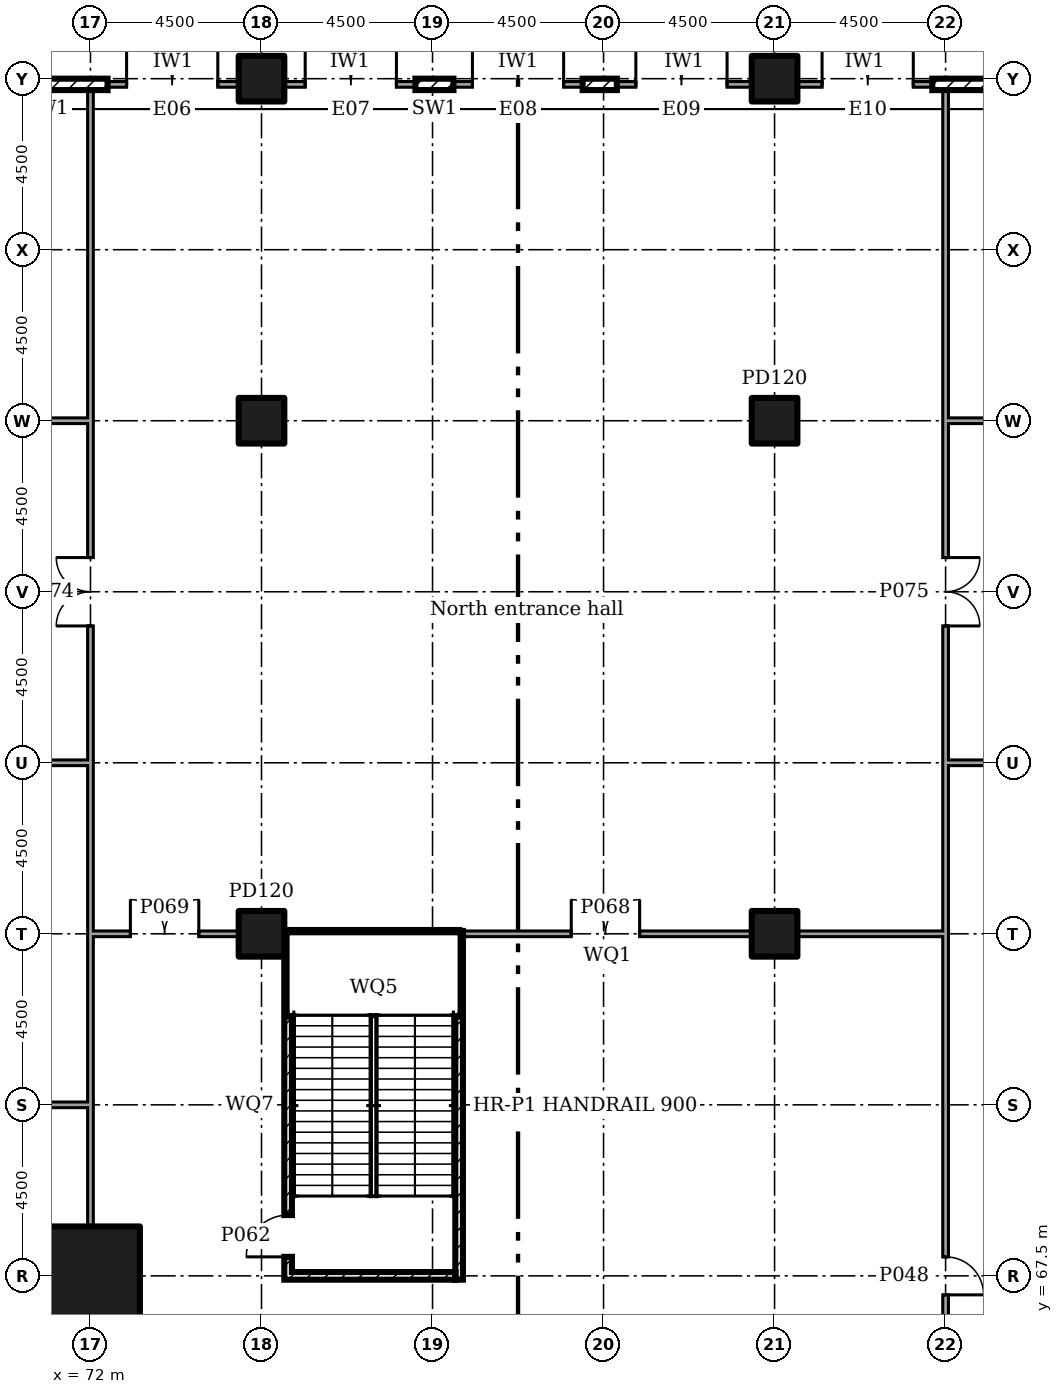
"""IFC4 building model, lengths in metres.
Left out: names, types, materials, properties, quantities, classifications, styles, units other than length and angle.
Written with IfcOpenShell. Run it as: python <this file> out.ifc"""

import sys

from ifc_helpers import new_model, si_unit, direction, frame, frame_2d, origin, origin_2d, place, context, subcontext, project, spatial, rectangle, extrude, element, fill, save


model = new_model("IFC4")
c1 = context("Model", 3, precision=1e-05, world=origin(), true_north=direction((0.0, 1.0)))
c2 = subcontext(c1, "Body", "Model", "MODEL_VIEW")
j1 = project(units=[si_unit("LENGTHUNIT", "METRE"), si_unit("PLANEANGLEUNIT", "RADIAN")], contexts=[c1])
p1 = place(None, origin())
s1 = spatial("IfcSite", under=j1, at=p1, CompositionType="ELEMENT")
p2 = place(p1, origin())
s2 = spatial("IfcBuilding", under=s1, at=p2, CompositionType="ELEMENT")
p3 = place(p2, origin())
s3 = spatial("IfcBuildingStorey", under=s2, at=p3, CompositionType="ELEMENT", Elevation=0.0)
p4 = place(p3, frame((72.0, 67.5, 0.0)))
e1 = element("IfcColumn", 1, at=p4, inside=s3, PredefinedType="COLUMN", context=c2, shape_type="SweptSolid", body=[
    extrude(rectangle(XDim=2.6, YDim=2.6, at=origin_2d()), origin(), (0.0, 0.0, 1.0), 6.0),
])
for number, where in (
    (2, (76.5, 76.5, 0.0)),
    (3, (76.5, 90.0, 0.0)),
    (4, (76.5, 99.0, 0.0)),
    (5, (90.0, 76.5, 0.0)),
    (6, (90.0, 90.0, 0.0)),
    (7, (90.0, 99.0, 0.0)),
):
    element("IfcColumn", number, at=place(p3, frame(where)), inside=s3, PredefinedType="COLUMN", context=c2, shape_type="SweptSolid", body=[
        extrude(rectangle(XDim=1.2, YDim=1.2, at=origin_2d()), origin(), (0.0, 0.0, 1.0), 6.0),
    ])
p5 = place(p3, frame((97.2, 98.85, 0.0), z_axis=(0.0, 0.0, 1.0), x_axis=(-1.0, 0.0, 0.0)))
e8 = element("IfcWall", 8, at=p5, inside=s3, PredefinedType="ELEMENTEDWALL", context=c2, shape_type="SweptSolid", body=[
    extrude(rectangle(XDim=3.05, YDim=0.3, at=frame_2d((1.525, 0.0))), origin(), (0.0, 0.0, 1.0), 5.55),
])
p6 = place(p3, frame((94.15, 98.85, 0.0), z_axis=(0.0, 0.0, 1.0), x_axis=(-1.0, 0.0, 0.0)))
e9 = element("IfcWall", 9, at=p6, inside=s3, PredefinedType="SOLIDWALL", context=c2, shape_type="SweptSolid", body=[
    extrude(rectangle(XDim=3.55, YDim=0.15, at=frame_2d((1.775, 0.0))), origin(), (0.0, 0.0, 1.0), 5.55),
])
p7 = place(p6, frame((0.5, 0.0, 0.0)))
e10 = element("IfcOpeningElement", 10, at=p7, cuts=e9, PredefinedType="OPENING", context=c2, shape_type="SweptSolid", body=[
    extrude(rectangle(XDim=2.4, YDim=2.7, at=frame_2d((1.2, 1.35))), frame((0.0, 0.085, 0.0), z_axis=(0.0, -1.0, 0.0), x_axis=(1.0, 0.0, 0.0)), (0.0, 0.0, 1.0), 0.17),
])
p8 = place(p3, frame((89.4, 98.85, 0.0), z_axis=(0.0, 0.0, 1.0), x_axis=(-1.0, 0.0, 0.0)))
e11 = element("IfcWall", 11, at=p8, inside=s3, PredefinedType="SOLIDWALL", context=c2, shape_type="SweptSolid", body=[
    extrude(rectangle(XDim=3.55, YDim=0.15, at=frame_2d((1.775, 0.0))), origin(), (0.0, 0.0, 1.0), 5.55),
])
p9 = place(p8, frame((0.65, 0.0, 0.0)))
e12 = element("IfcOpeningElement", 12, at=p9, cuts=e11, PredefinedType="OPENING", context=c2, shape_type="SweptSolid", body=[
    extrude(rectangle(XDim=2.4, YDim=2.7, at=frame_2d((1.2, 1.35))), frame((0.0, 0.085, 0.0), z_axis=(0.0, -1.0, 0.0), x_axis=(1.0, 0.0, 0.0)), (0.0, 0.0, 1.0), 0.17),
])
p10 = place(p3, frame((85.85, 98.85, 0.0), z_axis=(0.0, 0.0, 1.0), x_axis=(-1.0, 0.0, 0.0)))
e13 = element("IfcWall", 13, at=p10, inside=s3, PredefinedType="ELEMENTEDWALL", context=c2, shape_type="SweptSolid", body=[
    extrude(rectangle(XDim=0.9, YDim=0.3, at=frame_2d((0.45, 0.0))), origin(), (0.0, 0.0, 1.0), 5.55),
])
p11 = place(p3, frame((84.95, 98.85, 0.0), z_axis=(0.0, 0.0, 1.0), x_axis=(-1.0, 0.0, 0.0)))
e14 = element("IfcWall", 14, at=p11, inside=s3, PredefinedType="SOLIDWALL", context=c2, shape_type="SweptSolid", body=[
    extrude(rectangle(XDim=3.4, YDim=0.15, at=frame_2d((1.7, 0.0))), origin(), (0.0, 0.0, 1.0), 5.55),
])
p12 = place(p11, frame((0.5, 0.0, 0.0)))
e15 = element("IfcOpeningElement", 15, at=p12, cuts=e14, PredefinedType="OPENING", context=c2, shape_type="SweptSolid", body=[
    extrude(rectangle(XDim=2.4, YDim=2.7, at=frame_2d((1.2, 1.35))), frame((0.0, 0.085, 0.0), z_axis=(0.0, -1.0, 0.0), x_axis=(1.0, 0.0, 0.0)), (0.0, 0.0, 1.0), 0.17),
])
p13 = place(p3, frame((81.55, 98.85, 0.0), z_axis=(0.0, 0.0, 1.0), x_axis=(-1.0, 0.0, 0.0)))
e16 = element("IfcWall", 16, at=p13, inside=s3, PredefinedType="ELEMENTEDWALL", context=c2, shape_type="SweptSolid", body=[
    extrude(rectangle(XDim=1.0, YDim=0.3, at=frame_2d((0.5, 0.0))), origin(), (0.0, 0.0, 1.0), 5.55),
])
p14 = place(p3, frame((80.55, 98.85, 0.0), z_axis=(0.0, 0.0, 1.0), x_axis=(-1.0, 0.0, 0.0)))
e17 = element("IfcWall", 17, at=p14, inside=s3, PredefinedType="SOLIDWALL", context=c2, shape_type="SweptSolid", body=[
    extrude(rectangle(XDim=3.45, YDim=0.15, at=frame_2d((1.725, 0.0))), origin(), (0.0, 0.0, 1.0), 5.55),
])
p15 = place(p14, frame((0.5, 0.0, 0.0)))
e18 = element("IfcOpeningElement", 18, at=p15, cuts=e17, PredefinedType="OPENING", context=c2, shape_type="SweptSolid", body=[
    extrude(rectangle(XDim=2.4, YDim=2.7, at=frame_2d((1.2, 1.35))), frame((0.0, 0.085, 0.0), z_axis=(0.0, -1.0, 0.0), x_axis=(1.0, 0.0, 0.0)), (0.0, 0.0, 1.0), 0.17),
])
p16 = place(p3, frame((75.9, 98.85, 0.0), z_axis=(0.0, 0.0, 1.0), x_axis=(-1.0, 0.0, 0.0)))
e19 = element("IfcWall", 19, at=p16, inside=s3, PredefinedType="SOLIDWALL", context=c2, shape_type="SweptSolid", body=[
    extrude(rectangle(XDim=3.45, YDim=0.15, at=frame_2d((1.725, 0.0))), origin(), (0.0, 0.0, 1.0), 5.55),
])
p17 = place(p16, frame((0.55, 0.0, 0.0)))
e20 = element("IfcOpeningElement", 20, at=p17, cuts=e19, PredefinedType="OPENING", context=c2, shape_type="SweptSolid", body=[
    extrude(rectangle(XDim=2.4, YDim=2.7, at=frame_2d((1.2, 1.35))), frame((0.0, 0.085, 0.0), z_axis=(0.0, -1.0, 0.0), x_axis=(1.0, 0.0, 0.0)), (0.0, 0.0, 1.0), 0.17),
])
p18 = place(p3, frame((72.45, 98.85, 0.0), z_axis=(0.0, 0.0, 1.0), x_axis=(-1.0, 0.0, 0.0)))
e21 = element("IfcWall", 21, at=p18, inside=s3, PredefinedType="ELEMENTEDWALL", context=c2, shape_type="SweptSolid", body=[
    extrude(rectangle(XDim=3.25, YDim=0.3, at=frame_2d((1.625, 0.0))), origin(), (0.0, 0.0, 1.0), 5.55),
])
p19 = place(p3, frame((71.925, 76.5, 0.0)))
e22 = element("IfcWall", 22, at=p19, inside=s3, PredefinedType="PARTITIONING", context=c2, shape_type="SweptSolid", body=[
    extrude(rectangle(XDim=3.98, YDim=0.15, at=frame_2d((1.99, 0.0))), origin(), (0.0, 0.0, 1.0), 5.55),
])
p20 = place(p19, frame((1.125, 0.0, 0.0)))
e23 = element("IfcOpeningElement", 23, at=p20, cuts=e22, PredefinedType="OPENING", context=c2, shape_type="SweptSolid", body=[
    extrude(rectangle(XDim=1.8, YDim=2.1, at=frame_2d((0.9, 1.05))), frame((0.0, 0.085, 0.0), z_axis=(0.0, -1.0, 0.0), x_axis=(1.0, 0.0, 0.0)), (0.0, 0.0, 1.0), 0.17),
])
p21 = place(p3, frame((81.8, 76.5, 0.0)))
e24 = element("IfcWall", 24, at=p21, inside=s3, PredefinedType="PARTITIONING", context=c2, shape_type="SweptSolid", body=[
    extrude(rectangle(XDim=7.605, YDim=0.15, at=frame_2d((3.802, 0.0))), origin(), (0.0, 0.0, 1.0), 5.55),
])
p22 = place(p21, frame((2.85, 0.0, 0.0)))
e25 = element("IfcOpeningElement", 25, at=p22, cuts=e24, PredefinedType="OPENING", context=c2, shape_type="SweptSolid", body=[
    extrude(rectangle(XDim=1.8, YDim=2.1, at=frame_2d((0.9, 1.05))), frame((0.0, 0.085, 0.0), z_axis=(0.0, -1.0, 0.0), x_axis=(1.0, 0.0, 0.0)), (0.0, 0.0, 1.0), 0.17),
])
p23 = place(p3, frame((90.595, 76.5, 0.0)))
e26 = element("IfcWall", 26, at=p23, inside=s3, PredefinedType="PARTITIONING", context=c2, shape_type="SweptSolid", body=[
    extrude(rectangle(XDim=3.98, YDim=0.15, at=frame_2d((1.99, 0.0))), origin(), (0.0, 0.0, 1.0), 5.55),
])
p24 = place(p3, frame((72.0, 71.925, 0.0), z_axis=(0.0, 0.0, 1.0), x_axis=(0.0, 1.0, 0.0)))
e27 = element("IfcWall", 27, at=p24, inside=s3, PredefinedType="PARTITIONING", context=c2, shape_type="SweptSolid", body=[
    extrude(rectangle(XDim=4.5, YDim=0.15, at=frame_2d((2.25, 0.0))), origin(), (0.0, 0.0, 1.0), 5.55),
])
p25 = place(p3, frame((72.0, 68.795, 0.0), z_axis=(0.0, 0.0, 1.0), x_axis=(0.0, 1.0, 0.0)))
e28 = element("IfcWall", 28, at=p25, inside=s3, PredefinedType="PARTITIONING", context=c2, shape_type="SweptSolid", body=[
    extrude(rectangle(XDim=3.205, YDim=0.15, at=frame_2d((1.603, 0.0))), origin(), (0.0, 0.0, 1.0), 5.55),
])
p26 = place(p3, frame((94.5, 58.5, 0.0), z_axis=(0.0, 0.0, 1.0), x_axis=(0.0, 1.0, 0.0)))
e29 = element("IfcWall", 29, at=p26, inside=s3, PredefinedType="PARTITIONING", context=c2, shape_type="SweptSolid", body=[
    extrude(rectangle(XDim=17.925, YDim=0.15, at=frame_2d((8.962, 0.0))), origin(), (0.0, 0.0, 1.0), 5.55),
])
p27 = place(p26, frame((8.5, 0.0, 0.0)))
e30 = element("IfcOpeningElement", 30, at=p27, cuts=e29, PredefinedType="OPENING", context=c2, shape_type="SweptSolid", body=[
    extrude(rectangle(XDim=1.0, YDim=2.1, at=frame_2d((0.5, 1.05))), frame((0.0, 0.085, 0.0), z_axis=(0.0, -1.0, 0.0), x_axis=(1.0, 0.0, 0.0)), (0.0, 0.0, 1.0), 0.17),
])
p28 = place(p3, frame((77.2, 67.4, 0.0), z_axis=(0.0, 0.0, 1.0), x_axis=(0.0, 1.0, 0.0)))
e31 = element("IfcWall", 31, at=p28, inside=s3, PredefinedType="SOLIDWALL", context=c2, shape_type="SweptSolid", body=[
    extrude(rectangle(XDim=9.2, YDim=0.2, at=frame_2d((4.6, 0.0))), origin(), (0.0, 0.0, 1.0), 5.55),
])
p29 = place(p28, frame((0.6, 0.0, 0.0)))
e32 = element("IfcOpeningElement", 32, at=p29, cuts=e31, PredefinedType="OPENING", context=c2, shape_type="SweptSolid", body=[
    extrude(rectangle(XDim=1.1, YDim=2.1, at=frame_2d((0.55, 1.05))), frame((0.0, 0.11, 0.0), z_axis=(0.0, -1.0, 0.0), x_axis=(1.0, 0.0, 0.0)), (0.0, 0.0, 1.0), 0.22),
])
p30 = place(p3, frame((81.7, 67.4, 0.0), z_axis=(0.0, 0.0, 1.0), x_axis=(0.0, 1.0, 0.0)))
e33 = element("IfcWall", 33, at=p30, inside=s3, PredefinedType="SOLIDWALL", context=c2, shape_type="SweptSolid", body=[
    extrude(rectangle(XDim=9.175, YDim=0.2, at=frame_2d((4.587, 0.0))), origin(), (0.0, 0.0, 1.0), 5.55),
])
p31 = place(p3, frame((77.3, 67.5, 0.0)))
e34 = element("IfcWall", 34, at=p31, inside=s3, PredefinedType="SOLIDWALL", context=c2, shape_type="SweptSolid", body=[
    extrude(rectangle(XDim=4.3, YDim=0.2, at=frame_2d((2.15, 0.0))), origin(), (0.0, 0.0, 1.0), 5.55),
])
p32 = place(p3, frame((72.0, 80.925, 0.0), z_axis=(0.0, 0.0, 1.0), x_axis=(0.0, 1.0, 0.0)))
e35 = element("IfcWall", 35, at=p32, inside=s3, PredefinedType="PARTITIONING", context=c2, shape_type="SweptSolid", body=[
    extrude(rectangle(XDim=9.15, YDim=0.15, at=frame_2d((4.575, 0.0))), origin(), (0.0, 0.0, 1.0), 5.55),
])
p33 = place(p32, frame((3.675, 0.0, 0.0)))
e36 = element("IfcOpeningElement", 36, at=p33, cuts=e35, PredefinedType="OPENING", context=c2, shape_type="SweptSolid", body=[
    extrude(rectangle(XDim=1.8, YDim=2.1, at=frame_2d((0.9, 1.05))), frame((0.0, 0.085, 0.0), z_axis=(0.0, -1.0, 0.0), x_axis=(1.0, 0.0, 0.0)), (0.0, 0.0, 1.0), 0.17),
])
p34 = place(p3, frame((72.0, 90.0, 0.0), z_axis=(0.0, 0.0, 1.0), x_axis=(0.0, 1.0, 0.0)))
e37 = element("IfcWall", 37, at=p34, inside=s3, PredefinedType="PARTITIONING", context=c2, shape_type="SweptSolid", body=[
    extrude(rectangle(XDim=8.7, YDim=0.15, at=frame_2d((4.35, 0.0))), origin(), (0.0, 0.0, 1.0), 5.55),
])
p35 = place(p3, frame((72.0, 76.5, 0.0), z_axis=(0.0, 0.0, 1.0), x_axis=(0.0, 1.0, 0.0)))
e38 = element("IfcWall", 38, at=p35, inside=s3, PredefinedType="PARTITIONING", context=c2, shape_type="SweptSolid", body=[
    extrude(rectangle(XDim=4.5, YDim=0.15, at=frame_2d((2.25, 0.0))), origin(), (0.0, 0.0, 1.0), 5.55),
])
p36 = place(p3, frame((94.5, 76.5, 0.0), z_axis=(0.0, 0.0, 1.0), x_axis=(0.0, 1.0, 0.0)))
e39 = element("IfcWall", 39, at=p36, inside=s3, PredefinedType="PARTITIONING", context=c2, shape_type="SweptSolid", body=[
    extrude(rectangle(XDim=4.575, YDim=0.15, at=frame_2d((2.288, 0.0))), origin(), (0.0, 0.0, 1.0), 5.55),
])
p37 = place(p3, frame((94.5, 81.0, 0.0), z_axis=(0.0, 0.0, 1.0), x_axis=(0.0, 1.0, 0.0)))
e40 = element("IfcWall", 40, at=p37, inside=s3, PredefinedType="PARTITIONING", context=c2, shape_type="SweptSolid", body=[
    extrude(rectangle(XDim=9.075, YDim=0.15, at=frame_2d((4.538, 0.0))), origin(), (0.0, 0.0, 1.0), 5.55),
])
p38 = place(p37, frame((3.6, 0.0, 0.0)))
e41 = element("IfcOpeningElement", 41, at=p38, cuts=e40, PredefinedType="OPENING", context=c2, shape_type="SweptSolid", body=[
    extrude(rectangle(XDim=1.8, YDim=2.1, at=frame_2d((0.9, 1.05))), frame((0.0, 0.085, 0.0), z_axis=(0.0, -1.0, 0.0), x_axis=(1.0, 0.0, 0.0)), (0.0, 0.0, 1.0), 0.17),
])
p39 = place(p3, frame((94.5, 90.0, 0.0), z_axis=(0.0, 0.0, 1.0), x_axis=(0.0, 1.0, 0.0)))
e42 = element("IfcWall", 42, at=p39, inside=s3, PredefinedType="PARTITIONING", context=c2, shape_type="SweptSolid", body=[
    extrude(rectangle(XDim=8.7, YDim=0.15, at=frame_2d((4.35, 0.0))), origin(), (0.0, 0.0, 1.0), 5.55),
])
p40 = place(p3, frame((77.3, 76.5, 0.0)))
e43 = element("IfcWall", 43, at=p40, inside=s3, PredefinedType="SOLIDWALL", context=c2, shape_type="SweptSolid", body=[
    extrude(rectangle(XDim=4.4, YDim=0.2, at=frame_2d((2.2, 0.0))), origin(), (0.0, 0.0, 1.0), 5.55),
])
p41 = place(p3, frame((63.595, 90.0, 0.0)))
e44 = element("IfcWall", 44, at=p41, inside=s3, PredefinedType="PARTITIONING", context=c2, shape_type="SweptSolid", body=[
    extrude(rectangle(XDim=8.33, YDim=0.15, at=frame_2d((4.165, 0.0))), origin(), (0.0, 0.0, 1.0), 5.55),
])
p42 = place(p3, frame((58.5, 81.0, 0.0)))
e45 = element("IfcWall", 45, at=p42, inside=s3, PredefinedType="PARTITIONING", context=c2, shape_type="SweptSolid", body=[
    extrude(rectangle(XDim=13.425, YDim=0.15, at=frame_2d((6.712, 0.0))), origin(), (0.0, 0.0, 1.0), 5.55),
])
p43 = place(p42, frame((6.25, 0.0, 0.0)))
e46 = element("IfcOpeningElement", 46, at=p43, cuts=e45, PredefinedType="OPENING", context=c2, shape_type="SweptSolid", body=[
    extrude(rectangle(XDim=1.0, YDim=2.1, at=frame_2d((0.5, 1.05))), frame((0.0, 0.085, 0.0), z_axis=(0.0, -1.0, 0.0), x_axis=(1.0, 0.0, 0.0)), (0.0, 0.0, 1.0), 0.17),
])
p44 = place(p3, frame((68.795, 72.0, 0.0)))
e47 = element("IfcWall", 47, at=p44, inside=s3, PredefinedType="PARTITIONING", context=c2, shape_type="SweptSolid", body=[
    extrude(rectangle(XDim=3.13, YDim=0.15, at=frame_2d((1.565, 0.0))), origin(), (0.0, 0.0, 1.0), 5.55),
])
p45 = place(p3, frame((94.575, 81.0, 0.0)))
e48 = element("IfcWall", 48, at=p45, inside=s3, PredefinedType="PARTITIONING", context=c2, shape_type="SweptSolid", body=[
    extrude(rectangle(XDim=17.85, YDim=0.15, at=frame_2d((8.925, 0.0))), origin(), (0.0, 0.0, 1.0), 5.55),
])
p46 = place(p3, frame((94.575, 90.0, 0.0)))
e49 = element("IfcWall", 49, at=p46, inside=s3, PredefinedType="PARTITIONING", context=c2, shape_type="SweptSolid", body=[
    extrude(rectangle(XDim=8.33, YDim=0.15, at=frame_2d((4.165, 0.0))), origin(), (0.0, 0.0, 1.0), 5.55),
])
p47 = place(p46, frame((6.175, 0.0, 0.0)))
e50 = element("IfcOpeningElement", 50, at=p47, cuts=e49, PredefinedType="OPENING", context=c2, shape_type="SweptSolid", body=[
    extrude(rectangle(XDim=1.8, YDim=2.1, at=frame_2d((0.9, 1.05))), frame((0.0, 0.085, 0.0), z_axis=(0.0, -1.0, 0.0), x_axis=(1.0, 0.0, 0.0)), (0.0, 0.0, 1.0), 0.17),
])
for number, where in (
    (51, (77.3, 74.46, 0.0)),
    (52, (77.3, 75.8, 0.0)),
):
    element("IfcWall", number, at=place(p3, frame(where)), inside=s3, PredefinedType="SOLIDWALL", context=c2, shape_type="SweptSolid", body=[
        extrude(rectangle(XDim=4.3, YDim=0.2, at=frame_2d((2.15, 0.0))), origin(), (0.0, 0.0, 1.0), 2.8),
    ])
p48 = place(p7, frame((2.4, 0.0, 0.0), x_axis=(-1.0, 0.0, 0.0)))
e53 = element("IfcDoor", 53, at=p48, inside=s3, OperationType="DOUBLE_DOOR_DOUBLE_SWING", PredefinedType="NOTDEFINED", context=c2, shape_type="SweptSolid", body=[
    extrude(rectangle(XDim=2.4, YDim=2.7, at=frame_2d((1.2, 1.35))), frame((0.0, 0.025, 0.0), z_axis=(0.0, -1.0, 0.0), x_axis=(1.0, 0.0, 0.0)), (0.0, 0.0, 1.0), 0.05),
])
fill(e10, e53)
p49 = place(p9, frame((2.4, 0.0, 0.0), x_axis=(-1.0, 0.0, 0.0)))
e54 = element("IfcDoor", 54, at=p49, inside=s3, OperationType="DOUBLE_DOOR_DOUBLE_SWING", PredefinedType="NOTDEFINED", context=c2, shape_type="SweptSolid", body=[
    extrude(rectangle(XDim=2.4, YDim=2.7, at=frame_2d((1.2, 1.35))), frame((0.0, 0.025, 0.0), z_axis=(0.0, -1.0, 0.0), x_axis=(1.0, 0.0, 0.0)), (0.0, 0.0, 1.0), 0.05),
])
fill(e12, e54)
p50 = place(p12, frame((2.4, 0.0, 0.0), x_axis=(-1.0, 0.0, 0.0)))
e55 = element("IfcDoor", 55, at=p50, inside=s3, OperationType="DOUBLE_DOOR_DOUBLE_SWING", PredefinedType="NOTDEFINED", context=c2, shape_type="SweptSolid", body=[
    extrude(rectangle(XDim=2.4, YDim=2.7, at=frame_2d((1.2, 1.35))), frame((0.0, 0.025, 0.0), z_axis=(0.0, -1.0, 0.0), x_axis=(1.0, 0.0, 0.0)), (0.0, 0.0, 1.0), 0.05),
])
fill(e15, e55)
p51 = place(p15, frame((2.4, 0.0, 0.0), x_axis=(-1.0, 0.0, 0.0)))
e56 = element("IfcDoor", 56, at=p51, inside=s3, OperationType="DOUBLE_DOOR_DOUBLE_SWING", PredefinedType="NOTDEFINED", context=c2, shape_type="SweptSolid", body=[
    extrude(rectangle(XDim=2.4, YDim=2.7, at=frame_2d((1.2, 1.35))), frame((0.0, 0.025, 0.0), z_axis=(0.0, -1.0, 0.0), x_axis=(1.0, 0.0, 0.0)), (0.0, 0.0, 1.0), 0.05),
])
fill(e18, e56)
p52 = place(p17, frame((2.4, 0.0, 0.0), x_axis=(-1.0, 0.0, 0.0)))
e57 = element("IfcDoor", 57, at=p52, inside=s3, OperationType="DOUBLE_DOOR_DOUBLE_SWING", PredefinedType="NOTDEFINED", context=c2, shape_type="SweptSolid", body=[
    extrude(rectangle(XDim=2.4, YDim=2.7, at=frame_2d((1.2, 1.35))), frame((0.0, 0.025, 0.0), z_axis=(0.0, -1.0, 0.0), x_axis=(1.0, 0.0, 0.0)), (0.0, 0.0, 1.0), 0.05),
])
fill(e20, e57)
p53 = place(p27, frame((1.0, 0.0, 0.0), x_axis=(-1.0, 0.0, 0.0)))
e58 = element("IfcDoor", 58, at=p53, inside=s3, OperationType="SINGLE_SWING_LEFT", PredefinedType="DOOR", context=c2, shape_type="SweptSolid", body=[
    extrude(rectangle(XDim=1.0, YDim=2.1, at=frame_2d((0.5, 1.05))), frame((0.0, 0.025, 0.0), z_axis=(0.0, -1.0, 0.0), x_axis=(1.0, 0.0, 0.0)), (0.0, 0.0, 1.0), 0.05),
])
fill(e30, e58)
p54 = place(p29, origin())
e59 = element("IfcDoor", 59, at=p54, inside=s3, OperationType="SINGLE_SWING_RIGHT", PredefinedType="DOOR", context=c2, shape_type="SweptSolid", body=[
    extrude(rectangle(XDim=1.1, YDim=2.1, at=frame_2d((0.55, 1.05))), frame((0.0, 0.025, 0.0), z_axis=(0.0, -1.0, 0.0), x_axis=(1.0, 0.0, 0.0)), (0.0, 0.0, 1.0), 0.05),
])
fill(e32, e59)
p55 = place(p22, origin())
e60 = element("IfcDoor", 60, at=p55, inside=s3, OperationType="DOUBLE_DOOR_SINGLE_SWING", PredefinedType="DOOR", context=c2, shape_type="SweptSolid", body=[
    extrude(rectangle(XDim=1.8, YDim=2.1, at=frame_2d((0.9, 1.05))), frame((0.0, 0.025, 0.0), z_axis=(0.0, -1.0, 0.0), x_axis=(1.0, 0.0, 0.0)), (0.0, 0.0, 1.0), 0.05),
])
fill(e25, e60)
p56 = place(p20, origin())
e61 = element("IfcDoor", 61, at=p56, inside=s3, OperationType="DOUBLE_DOOR_SINGLE_SWING", PredefinedType="DOOR", context=c2, shape_type="SweptSolid", body=[
    extrude(rectangle(XDim=1.8, YDim=2.1, at=frame_2d((0.9, 1.05))), frame((0.0, 0.025, 0.0), z_axis=(0.0, -1.0, 0.0), x_axis=(1.0, 0.0, 0.0)), (0.0, 0.0, 1.0), 0.05),
])
fill(e23, e61)
p57 = place(p33, origin())
e62 = element("IfcDoor", 62, at=p57, inside=s3, OperationType="DOUBLE_DOOR_SINGLE_SWING", PredefinedType="DOOR", context=c2, shape_type="SweptSolid", body=[
    extrude(rectangle(XDim=1.8, YDim=2.1, at=frame_2d((0.9, 1.05))), frame((0.0, 0.025, 0.0), z_axis=(0.0, -1.0, 0.0), x_axis=(1.0, 0.0, 0.0)), (0.0, 0.0, 1.0), 0.05),
])
fill(e36, e62)
p58 = place(p38, frame((1.8, 0.0, 0.0), x_axis=(-1.0, 0.0, 0.0)))
e63 = element("IfcDoor", 63, at=p58, inside=s3, OperationType="DOUBLE_DOOR_SINGLE_SWING", PredefinedType="DOOR", context=c2, shape_type="SweptSolid", body=[
    extrude(rectangle(XDim=1.8, YDim=2.1, at=frame_2d((0.9, 1.05))), frame((0.0, 0.025, 0.0), z_axis=(0.0, -1.0, 0.0), x_axis=(1.0, 0.0, 0.0)), (0.0, 0.0, 1.0), 0.05),
])
fill(e41, e63)
save(model, sys.argv[1])
